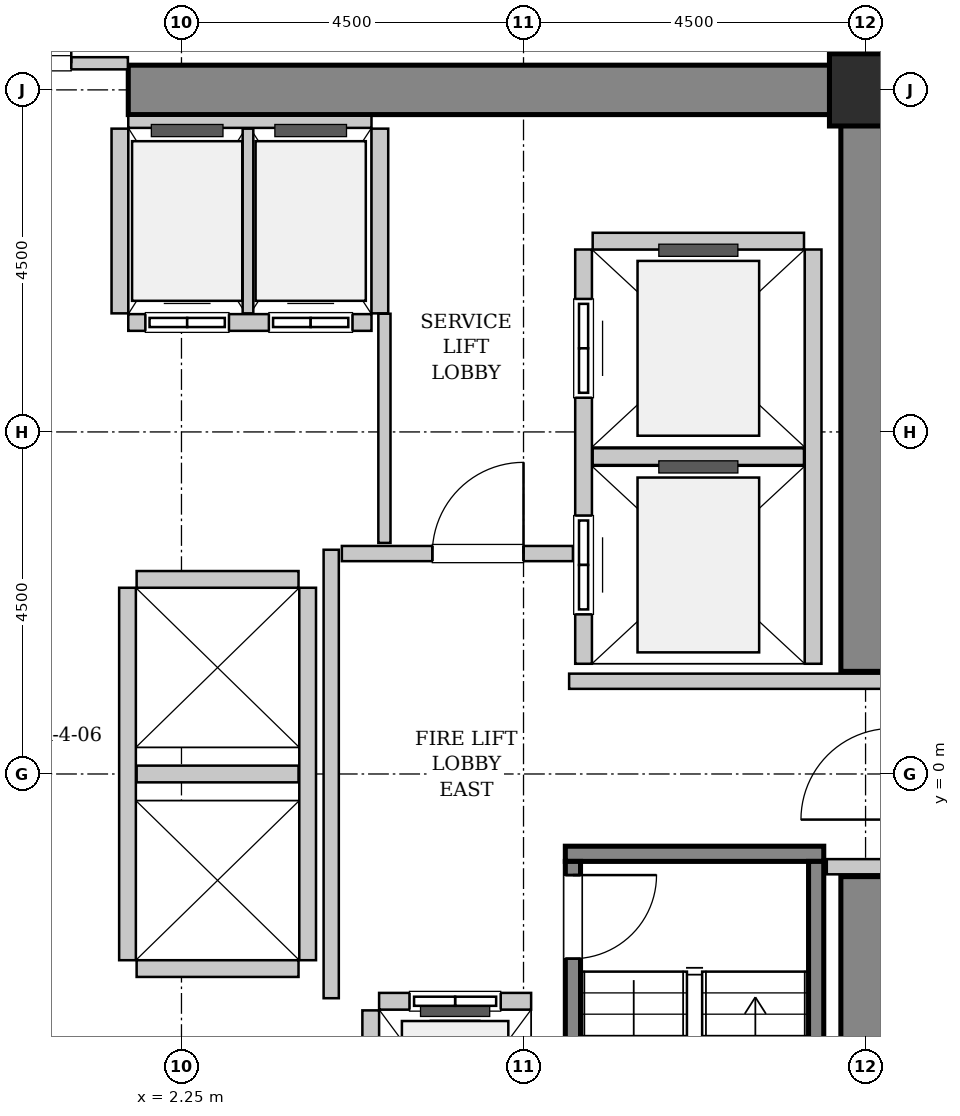
"""IFC4 building model, lengths in metres.
Left out: names, types, materials, properties, quantities, classifications, styles, units other than length and angle.
Written with IfcOpenShell. Run it as: python <this file> out.ifc"""

import sys

from ifc_helpers import new_model, si_unit, direction, frame, frame_2d, origin, origin_2d, place, context, subcontext, project, spatial, rectangle, hollow_rectangle, extrude, source, transform, mapped, element, fill, save


model = new_model("IFC4")
c1 = context("Model", 3, precision=1e-05, world=origin(), true_north=direction((0.0, 1.0)))
c2 = subcontext(c1, "Body", "Model", "MODEL_VIEW")
j1 = project(units=[si_unit("LENGTHUNIT", "METRE"), si_unit("PLANEANGLEUNIT", "RADIAN")], contexts=[c1])
p1 = place(None, origin())
s1 = spatial("IfcSite", under=j1, at=p1, CompositionType="ELEMENT")
p2 = place(p1, origin())
s2 = spatial("IfcBuilding", under=s1, at=p2, CompositionType="ELEMENT")
p3 = place(p2, frame((0.0, 0.0, 48.2)))
s3 = spatial("IfcBuildingStorey", under=s2, at=p3, CompositionType="ELEMENT", Elevation=48.2)
m1 = source(origin(), c2, "Body", "SweptSolid", [
    extrude(rectangle(XDim=10.025, YDim=0.65, at=frame_2d((5.012, 0.0))), origin(), (0.0, 0.0, 1.0), 3.8),
])
p4 = place(p3, frame((1.55, 9.0, 0.0), z_axis=(0.0, 0.0, 1.0), x_axis=(1.0, 0.0, 0.0)))
e1 = element("IfcWall", 1, at=p4, inside=s3, PredefinedType="SHEAR", context=c2, shape_type="MappedRepresentation", body=[
    mapped(m1, transform((0.0, 0.0, 0.0), x_axis=(1.0, 0.0, 0.0), y_axis=(0.0, 1.0, 0.0), z_axis=(0.0, 0.0, 1.0), scale=1.0)),
])
m2 = source(origin(), c2, "Body", "SweptSolid", [
    extrude(rectangle(XDim=7.325, YDim=0.65, at=frame_2d((3.663, 0.0))), origin(), (0.0, 0.0, 1.0), 3.8),
])
for number, where, z_axis, x_axis in (
    (2, (11.25, -8.675, 0.0), (0.0, 0.0, 1.0), (0.0, 1.0, 0.0)),
    (3, (11.25, 1.35, 0.0), (0.0, 0.0, 1.0), (0.0, 1.0, 0.0)),
):
    element("IfcWall", number, at=place(p3, frame(where, z_axis=z_axis, x_axis=x_axis)), inside=s3, PredefinedType="SHEAR", context=c2, shape_type="MappedRepresentation", body=[
        mapped(m2, transform((0.0, 0.0, 0.0), x_axis=(1.0, 0.0, 0.0), y_axis=(0.0, 1.0, 0.0), z_axis=(0.0, 0.0, 1.0), scale=1.0)),
    ])
m3 = source(origin(), c2, "Body", "SweptSolid", [
    extrude(hollow_rectangle(XDim=0.95, YDim=0.95, WallThickness=0.045, InnerFilletRadius=0.045, OuterFilletRadius=0.09, at=origin_2d()), origin(), (0.0, 0.0, 1.0), 3.8),
])
p5 = place(p3, frame((11.25, 9.0, 0.0), z_axis=(0.0, 0.0, 1.0), x_axis=(1.0, 0.0, 0.0)))
e4 = element("IfcColumn", 4, at=p5, inside=s3, PredefinedType="COLUMN", context=c2, shape_type="MappedRepresentation", body=[
    mapped(m3, transform((0.0, 0.0, 0.0), x_axis=(1.0, 0.0, 0.0), y_axis=(0.0, 1.0, 0.0), z_axis=(0.0, 0.0, 1.0), scale=1.0)),
])
m4 = source(origin(), c2, "Body", "SweptSolid", [
    extrude(rectangle(XDim=3.4, YDim=0.2, at=frame_2d((1.7, 0.0))), origin(), (0.0, 0.0, 1.0), 3.8),
])
p6 = place(p3, frame((7.3, -1.05, 0.0), z_axis=(0.0, 0.0, 1.0), x_axis=(1.0, 0.0, 0.0)))
e5 = element("IfcWall", 5, at=p6, inside=s3, PredefinedType="SOLIDWALL", context=c2, shape_type="MappedRepresentation", body=[
    mapped(m4, transform((0.0, 0.0, 0.0), x_axis=(1.0, 0.0, 0.0), y_axis=(0.0, 1.0, 0.0), z_axis=(0.0, 0.0, 1.0), scale=1.0)),
])
m5 = source(origin(), c2, "Body", "SweptSolid", [
    extrude(rectangle(XDim=7.1, YDim=0.2, at=frame_2d((3.55, 0.0))), origin(), (0.0, 0.0, 1.0), 3.8),
])
p7 = place(p3, frame((7.4, -1.15, 0.0), z_axis=(0.0, 0.0, 1.0), x_axis=(0.0, -1.0, 0.0)))
e6 = element("IfcWall", 6, at=p7, inside=s3, PredefinedType="SOLIDWALL", context=c2, shape_type="MappedRepresentation", body=[
    mapped(m5, transform((0.0, 0.0, 0.0), x_axis=(1.0, 0.0, 0.0), y_axis=(0.0, 1.0, 0.0), z_axis=(0.0, 0.0, 1.0), scale=1.0)),
])
p8 = place(p7, frame((0.18, 0.0, 0.0)))
e7 = element("IfcOpeningElement", 7, at=p8, cuts=e6, PredefinedType="OPENING", context=c2, shape_type="SweptSolid", body=[
    extrude(rectangle(XDim=1.1, YDim=2.15, at=frame_2d((0.55, 1.075))), frame((0.0, 0.11, 0.0), z_axis=(0.0, -1.0, 0.0), x_axis=(1.0, 0.0, 0.0)), (0.0, 0.0, 1.0), 0.22),
])
p9 = place(p3, frame((10.6, -1.15, 0.0), z_axis=(0.0, 0.0, 1.0), x_axis=(0.0, -1.0, 0.0)))
e8 = element("IfcWall", 8, at=p9, inside=s3, PredefinedType="SOLIDWALL", context=c2, shape_type="MappedRepresentation", body=[
    mapped(m5, transform((0.0, 0.0, 0.0), x_axis=(1.0, 0.0, 0.0), y_axis=(0.0, 1.0, 0.0), z_axis=(0.0, 0.0, 1.0), scale=1.0)),
])
m6 = source(origin(), c2, "Body", "SweptSolid", [
    extrude(rectangle(XDim=2.0, YDim=0.22, at=frame_2d((1.0, 0.0))), origin(), (0.0, 0.0, 1.0), 3.535),
])
p10 = place(p3, frame((6.85, -2.99, 0.0), z_axis=(0.0, 0.0, 1.0), x_axis=(-1.0, 0.0, 0.0)))
e9 = element("IfcWall", 9, at=p10, inside=s3, PredefinedType="SOLIDWALL", context=c2, shape_type="MappedRepresentation", body=[
    mapped(m6, transform((0.0, 0.0, 0.0), x_axis=(1.0, 0.0, 0.0), y_axis=(0.0, 1.0, 0.0), z_axis=(0.0, 0.0, 1.0), scale=1.0)),
])
p11 = place(p10, frame((0.4, 0.0, 0.0)))
e10 = element("IfcOpeningElement", 10, at=p11, cuts=e9, PredefinedType="OPENING", context=c2, shape_type="SweptSolid", body=[
    extrude(rectangle(XDim=1.2, YDim=2.2, at=frame_2d((0.6, 1.1))), frame((0.0, 0.12, 0.0), z_axis=(0.0, -1.0, 0.0), x_axis=(1.0, 0.0, 0.0)), (0.0, 0.0, 1.0), 0.24),
])
m7 = source(origin(), c2, "Body", "SweptSolid", [
    extrude(rectangle(XDim=2.68, YDim=0.22, at=frame_2d((1.34, 0.0))), origin(), (0.0, 0.0, 1.0), 3.535),
])
p12 = place(p3, frame((4.74, -3.11, 0.0), z_axis=(0.0, 0.0, 1.0), x_axis=(0.0, -1.0, 0.0)))
e11 = element("IfcWall", 11, at=p12, inside=s3, PredefinedType="SOLIDWALL", context=c2, shape_type="MappedRepresentation", body=[
    mapped(m7, transform((0.0, 0.0, 0.0), x_axis=(1.0, 0.0, 0.0), y_axis=(0.0, 1.0, 0.0), z_axis=(0.0, 0.0, 1.0), scale=1.0)),
])
m8 = source(origin(), c2, "Body", "SweptSolid", [
    extrude(rectangle(XDim=5.45, YDim=0.22, at=frame_2d((2.725, 0.0))), origin(), (0.0, 0.0, 1.0), 3.535),
])
p13 = place(p3, frame((7.54, 6.9, 0.0), z_axis=(0.0, 0.0, 1.0), x_axis=(0.0, -1.0, 0.0)))
e12 = element("IfcWall", 12, at=p13, inside=s3, PredefinedType="SOLIDWALL", context=c2, shape_type="MappedRepresentation", body=[
    mapped(m8, transform((0.0, 0.0, 0.0), x_axis=(1.0, 0.0, 0.0), y_axis=(0.0, 1.0, 0.0), z_axis=(0.0, 0.0, 1.0), scale=1.0)),
])
p14 = place(p13, frame((3.5, 0.0, 0.0)))
e13 = element("IfcOpeningElement", 13, at=p14, cuts=e12, PredefinedType="OPENING", context=c2, shape_type="SweptSolid", body=[
    extrude(rectangle(XDim=1.3, YDim=2.3, at=frame_2d((0.65, 1.15))), frame((0.0, 0.12, 0.0), z_axis=(0.0, -1.0, 0.0), x_axis=(1.0, 0.0, 0.0)), (0.0, 0.0, 1.0), 0.24),
])
p15 = place(p13, frame((0.65, 0.0, 0.0)))
e14 = element("IfcOpeningElement", 14, at=p15, cuts=e12, PredefinedType="OPENING", context=c2, shape_type="SweptSolid", body=[
    extrude(rectangle(XDim=1.3, YDim=2.3, at=frame_2d((0.65, 1.15))), frame((0.0, 0.12, 0.0), z_axis=(0.0, -1.0, 0.0), x_axis=(1.0, 0.0, 0.0)), (0.0, 0.0, 1.0), 0.24),
])
p16 = place(p3, frame((10.56, 1.45, 0.0), z_axis=(0.0, 0.0, 1.0), x_axis=(0.0, 1.0, 0.0)))
e15 = element("IfcWall", 15, at=p16, inside=s3, PredefinedType="SOLIDWALL", context=c2, shape_type="MappedRepresentation", body=[
    mapped(m8, transform((0.0, 0.0, 0.0), x_axis=(1.0, 0.0, 0.0), y_axis=(0.0, 1.0, 0.0), z_axis=(0.0, 0.0, 1.0), scale=1.0)),
])
m9 = source(origin(), c2, "Body", "SweptSolid", [
    extrude(rectangle(XDim=2.78, YDim=0.22, at=frame_2d((1.39, 0.0))), origin(), (0.0, 0.0, 1.0), 3.535),
])
for number, where, z_axis, x_axis in (
    (16, (7.66, 4.175, 0.0), (0.0, 0.0, 1.0), (1.0, 0.0, 0.0)),
    (17, (10.44, 7.01, 0.0), (0.0, 0.0, 1.0), (-1.0, 0.0, 0.0)),
):
    element("IfcWall", number, at=place(p3, frame(where, z_axis=z_axis, x_axis=x_axis)), inside=s3, PredefinedType="SOLIDWALL", context=c2, shape_type="MappedRepresentation", body=[
        mapped(m9, transform((0.0, 0.0, 0.0), x_axis=(1.0, 0.0, 0.0), y_axis=(0.0, 1.0, 0.0), z_axis=(0.0, 0.0, 1.0), scale=1.0)),
    ])
m10 = source(origin(), c2, "Body", "SweptSolid", [
    extrude(rectangle(XDim=3.2, YDim=0.22, at=frame_2d((1.6, 0.0))), origin(), (0.0, 0.0, 1.0), 3.535),
])
p17 = place(p3, frame((1.55, 5.94, 0.0), z_axis=(0.0, 0.0, 1.0), x_axis=(1.0, 0.0, 0.0)))
e18 = element("IfcWall", 18, at=p17, inside=s3, PredefinedType="SOLIDWALL", context=c2, shape_type="MappedRepresentation", body=[
    mapped(m10, transform((0.0, 0.0, 0.0), x_axis=(1.0, 0.0, 0.0), y_axis=(0.0, 1.0, 0.0), z_axis=(0.0, 0.0, 1.0), scale=1.0)),
])
p18 = place(p17, frame((0.225, 0.0, 0.0)))
e19 = element("IfcOpeningElement", 19, at=p18, cuts=e18, PredefinedType="OPENING", context=c2, shape_type="SweptSolid", body=[
    extrude(rectangle(XDim=1.1, YDim=2.2, at=frame_2d((0.55, 1.1))), frame((0.0, 0.12, 0.0), z_axis=(0.0, -1.0, 0.0), x_axis=(1.0, 0.0, 0.0)), (0.0, 0.0, 1.0), 0.24),
])
p19 = place(p17, frame((1.85, 0.0, 0.0)))
e20 = element("IfcOpeningElement", 20, at=p19, cuts=e18, PredefinedType="OPENING", context=c2, shape_type="SweptSolid", body=[
    extrude(rectangle(XDim=1.1, YDim=2.2, at=frame_2d((0.55, 1.1))), frame((0.0, 0.12, 0.0), z_axis=(0.0, -1.0, 0.0), x_axis=(1.0, 0.0, 0.0)), (0.0, 0.0, 1.0), 0.24),
])
m11 = source(origin(), c2, "Body", "SweptSolid", [
    extrude(rectangle(XDim=3.2, YDim=0.16, at=frame_2d((1.6, 0.0))), origin(), (0.0, 0.0, 1.0), 2.425),
])
p20 = place(p3, frame((4.75, 8.58, 0.0), z_axis=(0.0, 0.0, 1.0), x_axis=(-1.0, 0.0, 0.0)))
e21 = element("IfcWall", 21, at=p20, inside=s3, PredefinedType="PARTITIONING", context=c2, shape_type="MappedRepresentation", body=[
    mapped(m11, transform((0.0, 0.0, 0.0), x_axis=(1.0, 0.0, 0.0), y_axis=(0.0, 1.0, 0.0), z_axis=(0.0, 0.0, 1.0), scale=1.0)),
])
m12 = source(origin(), c2, "Body", "SweptSolid", [
    extrude(rectangle(XDim=2.43, YDim=0.22, at=frame_2d((1.215, 0.0))), origin(), (0.0, 0.0, 1.0), 3.535),
])
p21 = place(p3, frame((1.44, 8.49, 0.0), z_axis=(0.0, 0.0, 1.0), x_axis=(0.0, -1.0, 0.0)))
e22 = element("IfcWall", 22, at=p21, inside=s3, PredefinedType="SOLIDWALL", context=c2, shape_type="MappedRepresentation", body=[
    mapped(m12, transform((0.0, 0.0, 0.0), x_axis=(1.0, 0.0, 0.0), y_axis=(0.0, 1.0, 0.0), z_axis=(0.0, 0.0, 1.0), scale=1.0)),
])
m13 = source(origin(), c2, "Body", "SweptSolid", [
    extrude(rectangle(XDim=2.43, YDim=0.14, at=frame_2d((1.215, 0.0))), origin(), (0.0, 0.0, 1.0), 3.535),
])
p22 = place(p3, frame((3.125, 6.06, 0.0), z_axis=(0.0, 0.0, 1.0), x_axis=(0.0, 1.0, 0.0)))
e23 = element("IfcWall", 23, at=p22, inside=s3, PredefinedType="PARTITIONING", context=c2, shape_type="MappedRepresentation", body=[
    mapped(m13, transform((0.0, 0.0, 0.0), x_axis=(1.0, 0.0, 0.0), y_axis=(0.0, 1.0, 0.0), z_axis=(0.0, 0.0, 1.0), scale=1.0)),
])
p23 = place(p3, frame((4.86, 6.06, 0.0), z_axis=(0.0, 0.0, 1.0), x_axis=(0.0, 1.0, 0.0)))
e24 = element("IfcWall", 24, at=p23, inside=s3, PredefinedType="SOLIDWALL", context=c2, shape_type="MappedRepresentation", body=[
    mapped(m12, transform((0.0, 0.0, 0.0), x_axis=(1.0, 0.0, 0.0), y_axis=(0.0, 1.0, 0.0), z_axis=(0.0, 0.0, 1.0), scale=1.0)),
])
m14 = source(origin(), c2, "Body", "SweptSolid", [
    extrude(rectangle(XDim=4.9, YDim=0.22, at=frame_2d((2.45, 0.0))), origin(), (0.0, 0.0, 1.0), 3.535),
])
for number, where, z_axis, x_axis in (
    (25, (1.54, 2.45, 0.0), (0.0, 0.0, 1.0), (0.0, -1.0, 0.0)),
    (26, (3.91, -2.45, 0.0), (0.0, 0.0, 1.0), (0.0, 1.0, 0.0)),
):
    element("IfcWall", number, at=place(p3, frame(where, z_axis=z_axis, x_axis=x_axis)), inside=s3, PredefinedType="SOLIDWALL", context=c2, shape_type="MappedRepresentation", body=[
        mapped(m14, transform((0.0, 0.0, 0.0), x_axis=(1.0, 0.0, 0.0), y_axis=(0.0, 1.0, 0.0), z_axis=(0.0, 0.0, 1.0), scale=1.0)),
    ])
m15 = source(origin(), c2, "Body", "SweptSolid", [
    extrude(rectangle(XDim=2.13, YDim=0.22, at=frame_2d((1.065, 0.0))), origin(), (0.0, 0.0, 1.0), 3.535),
])
for number, where, z_axis, x_axis in (
    (27, (1.66, -2.56, 0.0), (0.0, 0.0, 1.0), (1.0, 0.0, 0.0)),
    (28, (1.66, 0.0, 0.0), (0.0, 0.0, 1.0), (1.0, 0.0, 0.0)),
    (29, (3.79, 2.56, 0.0), (0.0, 0.0, 1.0), (-1.0, 0.0, 0.0)),
):
    element("IfcWall", number, at=place(p3, frame(where, z_axis=z_axis, x_axis=x_axis)), inside=s3, PredefinedType="SOLIDWALL", context=c2, shape_type="MappedRepresentation", body=[
        mapped(m15, transform((0.0, 0.0, 0.0), x_axis=(1.0, 0.0, 0.0), y_axis=(0.0, 1.0, 0.0), z_axis=(0.0, 0.0, 1.0), scale=1.0)),
    ])
m16 = source(origin(), c2, "Body", "SweptSolid", [
    extrude(rectangle(XDim=5.9, YDim=0.2, at=frame_2d((2.95, 0.0))), origin(), (0.0, 0.0, 1.0), 3.535),
])
p24 = place(p3, frame((4.22, -2.95, 0.0), z_axis=(0.0, 0.0, 1.0), x_axis=(0.0, 1.0, 0.0)))
e30 = element("IfcWall", 30, at=p24, inside=s3, PredefinedType="PARTITIONING", context=c2, shape_type="MappedRepresentation", body=[
    mapped(m16, transform((0.0, 0.0, 0.0), x_axis=(1.0, 0.0, 0.0), y_axis=(0.0, 1.0, 0.0), z_axis=(0.0, 0.0, 1.0), scale=1.0)),
])
m17 = source(origin(), c2, "Body", "SweptSolid", [
    extrude(rectangle(XDim=3.04, YDim=0.2, at=frame_2d((1.52, 0.0))), origin(), (0.0, 0.0, 1.0), 3.535),
])
p25 = place(p3, frame((4.36, 2.9, 0.0), z_axis=(0.0, 0.0, 1.0), x_axis=(1.0, 0.0, 0.0)))
e31 = element("IfcWall", 31, at=p25, inside=s3, PredefinedType="PARTITIONING", context=c2, shape_type="MappedRepresentation", body=[
    mapped(m17, transform((0.0, 0.0, 0.0), x_axis=(1.0, 0.0, 0.0), y_axis=(0.0, 1.0, 0.0), z_axis=(0.0, 0.0, 1.0), scale=1.0)),
])
p26 = place(p25, frame((1.19, 0.0, 0.0)))
e32 = element("IfcOpeningElement", 32, at=p26, cuts=e31, PredefinedType="OPENING", context=c2, shape_type="SweptSolid", body=[
    extrude(rectangle(XDim=1.2, YDim=2.15, at=frame_2d((0.6, 1.075))), frame((0.0, 0.11, 0.0), z_axis=(0.0, -1.0, 0.0), x_axis=(1.0, 0.0, 0.0)), (0.0, 0.0, 1.0), 0.22),
])
m18 = source(origin(), c2, "Body", "SweptSolid", [
    extrude(rectangle(XDim=4.11, YDim=0.2, at=frame_2d((2.055, 0.0))), origin(), (0.0, 0.0, 1.0), 3.535),
])
p27 = place(p3, frame((7.35, 1.22, 0.0), z_axis=(0.0, 0.0, 1.0), x_axis=(1.0, 0.0, 0.0)))
e33 = element("IfcWall", 33, at=p27, inside=s3, PredefinedType="PARTITIONING", context=c2, shape_type="MappedRepresentation", body=[
    mapped(m18, transform((0.0, 0.0, 0.0), x_axis=(1.0, 0.0, 0.0), y_axis=(0.0, 1.0, 0.0), z_axis=(0.0, 0.0, 1.0), scale=1.0)),
])
m19 = source(origin(), c2, "Body", "SweptSolid", [
    extrude(rectangle(XDim=0.72, YDim=0.2, at=frame_2d((0.36, 0.0))), origin(), (0.0, 0.0, 1.0), 3.535),
])
p28 = place(p3, frame((10.74, -1.22, 0.0), z_axis=(0.0, 0.0, 1.0), x_axis=(1.0, 0.0, 0.0)))
e34 = element("IfcWall", 34, at=p28, inside=s3, PredefinedType="PARTITIONING", context=c2, shape_type="MappedRepresentation", body=[
    mapped(m19, transform((0.0, 0.0, 0.0), x_axis=(1.0, 0.0, 0.0), y_axis=(0.0, 1.0, 0.0), z_axis=(0.0, 0.0, 1.0), scale=1.0)),
])
m20 = source(origin(), c2, "Body", "SweptSolid", [
    extrude(rectangle(XDim=3.09, YDim=0.16, at=frame_2d((1.545, 0.0))), origin(), (0.0, 0.0, 1.0), 2.425),
])
p29 = place(p3, frame((-1.545, 9.35, 0.0), z_axis=(0.0, 0.0, 1.0), x_axis=(1.0, 0.0, 0.0)))
e35 = element("IfcWall", 35, at=p29, inside=s3, PredefinedType="PARTITIONING", context=c2, shape_type="MappedRepresentation", body=[
    mapped(m20, transform((0.0, 0.0, 0.0), x_axis=(1.0, 0.0, 0.0), y_axis=(0.0, 1.0, 0.0), z_axis=(0.0, 0.0, 1.0), scale=1.0)),
])
p30 = place(p29, frame((0.745, 0.0, 0.0)))
e36 = element("IfcOpeningElement", 36, at=p30, cuts=e35, PredefinedType="OPENING", context=c2, shape_type="SweptSolid", body=[
    extrude(rectangle(XDim=1.6, YDim=2.3, at=frame_2d((0.8, 1.15))), frame((0.0, 0.09, 0.0), z_axis=(0.0, -1.0, 0.0), x_axis=(1.0, 0.0, 0.0)), (0.0, 0.0, 1.0), 0.18),
])
m21 = source(origin(), c2, "Body", "SweptSolid", [
    extrude(rectangle(XDim=3.015, YDim=0.16, at=frame_2d((1.507, 0.0))), origin(), (0.0, 0.0, 1.0), 3.535),
])
p31 = place(p3, frame((4.92, 3.04, 0.0), z_axis=(0.0, 0.0, 1.0), x_axis=(0.0, 1.0, 0.0)))
e37 = element("IfcWall", 37, at=p31, inside=s3, PredefinedType="PARTITIONING", context=c2, shape_type="MappedRepresentation", body=[
    mapped(m21, transform((0.0, 0.0, 0.0), x_axis=(1.0, 0.0, 0.0), y_axis=(0.0, 1.0, 0.0), z_axis=(0.0, 0.0, 1.0), scale=1.0)),
])
m22 = source(origin(), c2, "Body", "SweptSolid", [
    extrude(rectangle(XDim=1.1, YDim=2.15, at=frame_2d((0.55, 1.075))), frame((0.0, 0.025, 0.0), z_axis=(0.0, -1.0, 0.0), x_axis=(1.0, 0.0, 0.0)), (0.0, 0.0, 1.0), 0.05),
])
p32 = place(p8, origin())
e38 = element("IfcDoor", 38, at=p32, inside=s3, OperationType="SINGLE_SWING_LEFT", PredefinedType="DOOR", context=c2, shape_type="MappedRepresentation", body=[
    mapped(m22, transform((0.0, 0.0, 0.0), x_axis=(1.0, 0.0, 0.0), y_axis=(0.0, 1.0, 0.0), z_axis=(0.0, 0.0, 1.0), scale=1.0)),
])
fill(e7, e38)
m23 = source(origin(), c2, "Body", "SweptSolid", [
    extrude(rectangle(XDim=1.2, YDim=2.2, at=frame_2d((0.6, 1.1))), frame((0.0, 0.025, 0.0), z_axis=(0.0, -1.0, 0.0), x_axis=(1.0, 0.0, 0.0)), (0.0, 0.0, 1.0), 0.05),
])
p33 = place(p11, origin())
e39 = element("IfcDoor", 39, at=p33, inside=s3, OperationType="SLIDING_TO_LEFT", PredefinedType="DOOR", context=c2, shape_type="MappedRepresentation", body=[
    mapped(m23, transform((0.0, 0.0, 0.0), x_axis=(1.0, 0.0, 0.0), y_axis=(0.0, 1.0, 0.0), z_axis=(0.0, 0.0, 1.0), scale=1.0)),
])
fill(e10, e39)
m24 = source(origin(), c2, "Body", "SweptSolid", [
    extrude(rectangle(XDim=1.3, YDim=2.3, at=frame_2d((0.65, 1.15))), frame((0.0, 0.025, 0.0), z_axis=(0.0, -1.0, 0.0), x_axis=(1.0, 0.0, 0.0)), (0.0, 0.0, 1.0), 0.05),
])
p34 = place(p14, origin())
e40 = element("IfcDoor", 40, at=p34, inside=s3, OperationType="SLIDING_TO_RIGHT", PredefinedType="DOOR", context=c2, shape_type="MappedRepresentation", body=[
    mapped(m24, transform((0.0, 0.0, 0.0), x_axis=(1.0, 0.0, 0.0), y_axis=(0.0, 1.0, 0.0), z_axis=(0.0, 0.0, 1.0), scale=1.0)),
])
fill(e13, e40)
p35 = place(p15, origin())
e41 = element("IfcDoor", 41, at=p35, inside=s3, OperationType="SLIDING_TO_RIGHT", PredefinedType="DOOR", context=c2, shape_type="MappedRepresentation", body=[
    mapped(m24, transform((0.0, 0.0, 0.0), x_axis=(1.0, 0.0, 0.0), y_axis=(0.0, 1.0, 0.0), z_axis=(0.0, 0.0, 1.0), scale=1.0)),
])
fill(e14, e41)
m25 = source(origin(), c2, "Body", "SweptSolid", [
    extrude(rectangle(XDim=1.1, YDim=2.2, at=frame_2d((0.55, 1.1))), frame((0.0, 0.025, 0.0), z_axis=(0.0, -1.0, 0.0), x_axis=(1.0, 0.0, 0.0)), (0.0, 0.0, 1.0), 0.05),
])
p36 = place(p18, origin())
e42 = element("IfcDoor", 42, at=p36, inside=s3, OperationType="DOUBLE_DOOR_SLIDING", PredefinedType="DOOR", context=c2, shape_type="MappedRepresentation", body=[
    mapped(m25, transform((0.0, 0.0, 0.0), x_axis=(1.0, 0.0, 0.0), y_axis=(0.0, 1.0, 0.0), z_axis=(0.0, 0.0, 1.0), scale=1.0)),
])
fill(e19, e42)
p37 = place(p19, origin())
e43 = element("IfcDoor", 43, at=p37, inside=s3, OperationType="DOUBLE_DOOR_SLIDING", PredefinedType="DOOR", context=c2, shape_type="MappedRepresentation", body=[
    mapped(m25, transform((0.0, 0.0, 0.0), x_axis=(1.0, 0.0, 0.0), y_axis=(0.0, 1.0, 0.0), z_axis=(0.0, 0.0, 1.0), scale=1.0)),
])
fill(e20, e43)
m26 = source(origin(), c2, "Body", "SweptSolid", [
    extrude(rectangle(XDim=1.2, YDim=2.15, at=frame_2d((0.6, 1.075))), frame((0.0, 0.025, 0.0), z_axis=(0.0, -1.0, 0.0), x_axis=(1.0, 0.0, 0.0)), (0.0, 0.0, 1.0), 0.05),
])
p38 = place(p26, origin())
e44 = element("IfcDoor", 44, at=p38, inside=s3, OperationType="SINGLE_SWING_RIGHT", PredefinedType="DOOR", context=c2, shape_type="MappedRepresentation", body=[
    mapped(m26, transform((0.0, 0.0, 0.0), x_axis=(1.0, 0.0, 0.0), y_axis=(0.0, 1.0, 0.0), z_axis=(0.0, 0.0, 1.0), scale=1.0)),
])
fill(e32, e44)
m27 = source(origin(), c2, "Body", "SweptSolid", [
    extrude(rectangle(XDim=1.6, YDim=2.3, at=frame_2d((0.8, 1.15))), frame((0.0, 0.025, 0.0), z_axis=(0.0, -1.0, 0.0), x_axis=(1.0, 0.0, 0.0)), (0.0, 0.0, 1.0), 0.05),
])
p39 = place(p30, origin())
e45 = element("IfcDoor", 45, at=p39, inside=s3, OperationType="DOUBLE_DOOR_SINGLE_SWING", PredefinedType="DOOR", context=c2, shape_type="MappedRepresentation", body=[
    mapped(m27, transform((0.0, 0.0, 0.0), x_axis=(1.0, 0.0, 0.0), y_axis=(0.0, 1.0, 0.0), z_axis=(0.0, 0.0, 1.0), scale=1.0)),
])
fill(e36, e45)
save(model, sys.argv[1])
